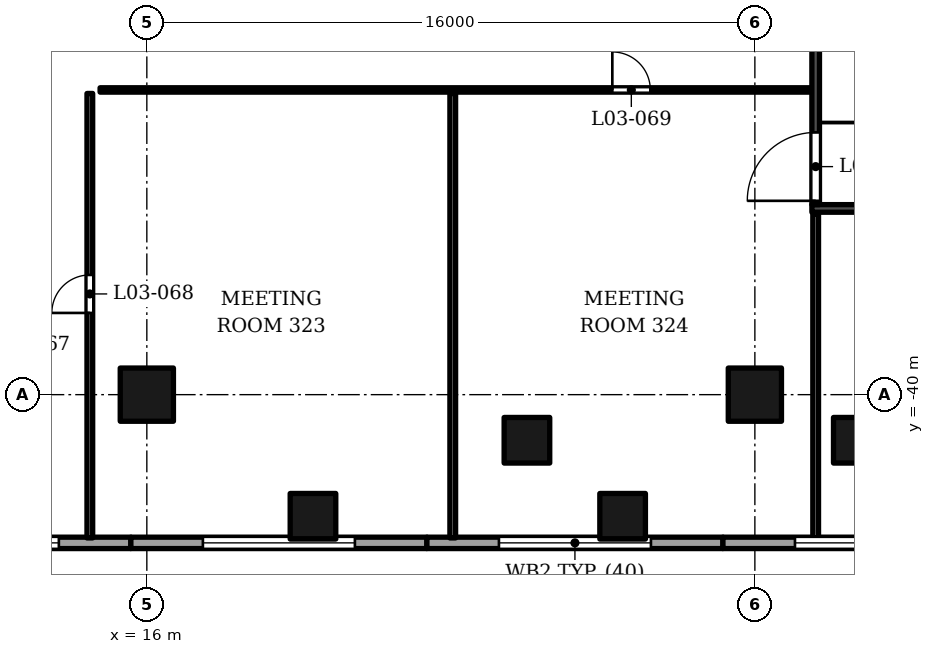
"""IFC4 building model, lengths in metres.
Left out: names, types, materials, properties, quantities, classifications, styles, units other than length and angle.
Written with IfcOpenShell. Run it as: python <this file> out.ifc"""

import sys

from ifc_helpers import new_model, si_unit, direction, frame, frame_2d, origin, origin_2d, place, context, subcontext, project, spatial, rectangle, extrude, element, fill, save


model = new_model("IFC4")
c1 = context("Model", 3, precision=1e-05, world=origin(), true_north=direction((0.0, 1.0)))
c2 = subcontext(c1, "Body", "Model", "MODEL_VIEW")
j1 = project(units=[si_unit("LENGTHUNIT", "METRE"), si_unit("PLANEANGLEUNIT", "RADIAN")], contexts=[c1])
p1 = place(None, origin())
s1 = spatial("IfcSite", under=j1, at=p1, CompositionType="ELEMENT")
p2 = place(p1, origin())
s2 = spatial("IfcBuilding", under=s1, at=p2, CompositionType="ELEMENT")
p3 = place(p2, frame((0.0, 0.0, 29.0)))
s3 = spatial("IfcBuildingStorey", under=s2, at=p3, CompositionType="ELEMENT", Elevation=29.0)
for number, where, z_axis, x_axis in (
    (1, (16.0, -40.0, 0.0), (0.0, 0.0, 1.0), (1.0, 0.0, 0.0)),
    (2, (32.0, -40.0, 0.0), (0.0, 0.0, 1.0), (1.0, 0.0, 0.0)),
):
    element("IfcColumn", number, at=place(p3, frame(where, z_axis=z_axis, x_axis=x_axis)), inside=s3, PredefinedType="COLUMN", context=c2, shape_type="SweptSolid", body=[
        extrude(rectangle(XDim=1.4, YDim=1.4, at=origin_2d()), origin(), (0.0, 0.0, 1.0), 5.5),
    ])
for number, where, z_axis, x_axis in (
    (3, (34.669, -41.2, 0.0), (0.0, 0.0, 1.0), (1.0, 0.0, 0.0)),
    (4, (26.002, -41.2, 0.0), (0.0, 0.0, 1.0), (1.0, 0.0, 0.0)),
    (5, (28.52, -43.2, 0.0), (0.0, 0.0, 1.0), (1.0, 0.0, 0.0)),
    (6, (20.372, -43.2, 0.0), (0.0, 0.0, 1.0), (1.0, 0.0, 0.0)),
):
    element("IfcColumn", number, at=place(p3, frame(where, z_axis=z_axis, x_axis=x_axis)), inside=s3, PredefinedType="COLUMN", context=c2, shape_type="SweptSolid", body=[
        extrude(rectangle(XDim=1.2, YDim=1.2, at=origin_2d()), origin(), (0.0, 0.0, 1.0), 5.5),
    ])
p4 = place(p3, frame((7.79, -43.9, 0.0), z_axis=(0.0, 0.0, 1.0), x_axis=(1.0, 0.0, 0.0)))
e7 = element("IfcWall", 7, at=p4, inside=s3, PredefinedType="SOLIDWALL", context=c2, shape_type="SweptSolid", body=[
    extrude(rectangle(XDim=7.79, YDim=0.3, at=frame_2d((3.895, 0.0))), origin(), (0.0, 0.0, 1.0), 4.1),
])
p5 = place(p4, frame((1.895, 0.0, 1.0)))
e8 = element("IfcOpeningElement", 8, at=p5, cuts=e7, PredefinedType="OPENING", context=c2, shape_type="SweptSolid", body=[
    extrude(rectangle(XDim=4.0, YDim=1.8, at=frame_2d((2.0, 0.9))), frame((0.0, 0.16, 0.0), z_axis=(0.0, -1.0, 0.0), x_axis=(1.0, 0.0, 0.0)), (0.0, 0.0, 1.0), 0.32),
])
p6 = place(p3, frame((15.58, -43.9, 0.0), z_axis=(0.0, 0.0, 1.0), x_axis=(1.0, 0.0, 0.0)))
e9 = element("IfcWall", 9, at=p6, inside=s3, PredefinedType="SOLIDWALL", context=c2, shape_type="SweptSolid", body=[
    extrude(rectangle(XDim=7.79, YDim=0.3, at=frame_2d((3.895, 0.0))), origin(), (0.0, 0.0, 1.0), 4.1),
])
p7 = place(p6, frame((1.895, 0.0, 1.0)))
e10 = element("IfcOpeningElement", 10, at=p7, cuts=e9, PredefinedType="OPENING", context=c2, shape_type="SweptSolid", body=[
    extrude(rectangle(XDim=4.0, YDim=1.8, at=frame_2d((2.0, 0.9))), frame((0.0, 0.16, 0.0), z_axis=(0.0, -1.0, 0.0), x_axis=(1.0, 0.0, 0.0)), (0.0, 0.0, 1.0), 0.32),
])
p8 = place(p3, frame((23.37, -43.9, 0.0), z_axis=(0.0, 0.0, 1.0), x_axis=(1.0, 0.0, 0.0)))
e11 = element("IfcWall", 11, at=p8, inside=s3, PredefinedType="SOLIDWALL", context=c2, shape_type="SweptSolid", body=[
    extrude(rectangle(XDim=7.79, YDim=0.3, at=frame_2d((3.895, 0.0))), origin(), (0.0, 0.0, 1.0), 4.1),
])
p9 = place(p8, frame((1.895, 0.0, 1.0)))
e12 = element("IfcOpeningElement", 12, at=p9, cuts=e11, PredefinedType="OPENING", context=c2, shape_type="SweptSolid", body=[
    extrude(rectangle(XDim=4.0, YDim=1.8, at=frame_2d((2.0, 0.9))), frame((0.0, 0.16, 0.0), z_axis=(0.0, -1.0, 0.0), x_axis=(1.0, 0.0, 0.0)), (0.0, 0.0, 1.0), 0.32),
])
p10 = place(p3, frame((31.16, -43.9, 0.0), z_axis=(0.0, 0.0, 1.0), x_axis=(1.0, 0.0, 0.0)))
e13 = element("IfcWall", 13, at=p10, inside=s3, PredefinedType="SOLIDWALL", context=c2, shape_type="SweptSolid", body=[
    extrude(rectangle(XDim=7.79, YDim=0.3, at=frame_2d((3.895, 0.0))), origin(), (0.0, 0.0, 1.0), 4.1),
])
p11 = place(p10, frame((1.895, 0.0, 1.0)))
e14 = element("IfcOpeningElement", 14, at=p11, cuts=e13, PredefinedType="OPENING", context=c2, shape_type="SweptSolid", body=[
    extrude(rectangle(XDim=4.0, YDim=1.8, at=frame_2d((2.0, 0.9))), frame((0.0, 0.16, 0.0), z_axis=(0.0, -1.0, 0.0), x_axis=(1.0, 0.0, 0.0)), (0.0, 0.0, 1.0), 0.32),
])
p12 = place(p3, frame((33.5, -35.1, 0.0), z_axis=(0.0, 0.0, 1.0), x_axis=(1.0, 0.0, 0.0)))
e15 = element("IfcWall", 15, at=p12, inside=s3, PredefinedType="SOLIDWALL", context=c2, shape_type="SweptSolid", body=[
    extrude(rectangle(XDim=4.87, YDim=0.2, at=frame_2d((2.435, 0.0))), origin(), (0.0, 0.0, 1.0), 5.05),
])
p13 = place(p3, frame((33.6, -35.0, 0.0), z_axis=(0.0, 0.0, 1.0), x_axis=(0.0, 1.0, 0.0)))
e16 = element("IfcWall", 16, at=p13, inside=s3, PredefinedType="SOLIDWALL", context=c2, shape_type="SweptSolid", body=[
    extrude(rectangle(XDim=6.65, YDim=0.2, at=frame_2d((3.325, 0.0))), origin(), (0.0, 0.0, 1.0), 5.05),
])
p14 = place(p13, frame((0.1, 0.0, 0.0)))
e17 = element("IfcOpeningElement", 17, at=p14, cuts=e16, PredefinedType="OPENING", context=c2, shape_type="SweptSolid", body=[
    extrude(rectangle(XDim=1.8, YDim=2.4, at=frame_2d((0.9, 1.2))), frame((0.0, 0.11, 0.0), z_axis=(0.0, -1.0, 0.0), x_axis=(1.0, 0.0, 0.0)), (0.0, 0.0, 1.0), 0.22),
])
p15 = place(p3, frame((14.5, -43.77, 0.0), z_axis=(0.0, 0.0, 1.0), x_axis=(0.0, 1.0, 0.0)))
e18 = element("IfcWall", 18, at=p15, inside=s3, PredefinedType="PARTITIONING", context=c2, shape_type="SweptSolid", body=[
    extrude(rectangle(XDim=11.695, YDim=0.15, at=frame_2d((5.848, 0.0))), origin(), (0.0, 0.0, 1.0), 3.85),
])
p16 = place(p15, frame((5.92, 0.0, 0.0)))
e19 = element("IfcOpeningElement", 19, at=p16, cuts=e18, PredefinedType="OPENING", context=c2, shape_type="SweptSolid", body=[
    extrude(rectangle(XDim=1.0, YDim=2.1, at=frame_2d((0.5, 1.05))), frame((0.0, 0.085, 0.0), z_axis=(0.0, -1.0, 0.0), x_axis=(1.0, 0.0, 0.0)), (0.0, 0.0, 1.0), 0.17),
])
p17 = place(p3, frame((24.05, -43.77, 0.0), z_axis=(0.0, 0.0, 1.0), x_axis=(0.0, 1.0, 0.0)))
e20 = element("IfcWall", 20, at=p17, inside=s3, PredefinedType="PARTITIONING", context=c2, shape_type="SweptSolid", body=[
    extrude(rectangle(XDim=11.695, YDim=0.15, at=frame_2d((5.848, 0.0))), origin(), (0.0, 0.0, 1.0), 3.85),
])
p18 = place(p3, frame((33.6, -43.77, 0.0), z_axis=(0.0, 0.0, 1.0), x_axis=(0.0, 1.0, 0.0)))
e21 = element("IfcWall", 21, at=p18, inside=s3, PredefinedType="PARTITIONING", context=c2, shape_type="SweptSolid", body=[
    extrude(rectangle(XDim=8.53, YDim=0.15, at=frame_2d((4.265, 0.0))), origin(), (0.0, 0.0, 1.0), 3.85),
])
p19 = place(p3, frame((14.77, -31.982, 0.0), z_axis=(0.0, 0.0, 1.0), x_axis=(1.0, 0.0, 0.0)))
e22 = element("IfcWall", 22, at=p19, inside=s3, PredefinedType="PARTITIONING", context=c2, shape_type="SweptSolid", body=[
    extrude(rectangle(XDim=18.69, YDim=0.115, at=frame_2d((9.345, 0.0))), origin(), (0.0, 0.0, 1.0), 3.85),
])
p20 = place(p19, frame((13.479, 0.0, 0.0)))
e23 = element("IfcOpeningElement", 23, at=p20, cuts=e22, PredefinedType="OPENING", context=c2, shape_type="SweptSolid", body=[
    extrude(rectangle(XDim=1.0, YDim=2.1, at=frame_2d((0.5, 1.05))), frame((0.0, 0.067, 0.0), z_axis=(0.0, -1.0, 0.0), x_axis=(1.0, 0.0, 0.0)), (0.0, 0.0, 1.0), 0.135),
])
p21 = place(p5, origin())
e24 = element("IfcWindow", 24, at=p21, inside=s3, PartitioningType="SINGLE_PANEL", PredefinedType="WINDOW", context=c2, shape_type="SweptSolid", body=[
    extrude(rectangle(XDim=4.0, YDim=1.8, at=frame_2d((2.0, 0.9))), frame((0.0, 0.03, 0.0), z_axis=(0.0, -1.0, 0.0), x_axis=(1.0, 0.0, 0.0)), (0.0, 0.0, 1.0), 0.06),
])
fill(e8, e24)
p22 = place(p7, origin())
e25 = element("IfcWindow", 25, at=p22, inside=s3, PartitioningType="SINGLE_PANEL", PredefinedType="WINDOW", context=c2, shape_type="SweptSolid", body=[
    extrude(rectangle(XDim=4.0, YDim=1.8, at=frame_2d((2.0, 0.9))), frame((0.0, 0.03, 0.0), z_axis=(0.0, -1.0, 0.0), x_axis=(1.0, 0.0, 0.0)), (0.0, 0.0, 1.0), 0.06),
])
fill(e10, e25)
p23 = place(p9, origin())
e26 = element("IfcWindow", 26, at=p23, inside=s3, PartitioningType="SINGLE_PANEL", PredefinedType="WINDOW", context=c2, shape_type="SweptSolid", body=[
    extrude(rectangle(XDim=4.0, YDim=1.8, at=frame_2d((2.0, 0.9))), frame((0.0, 0.03, 0.0), z_axis=(0.0, -1.0, 0.0), x_axis=(1.0, 0.0, 0.0)), (0.0, 0.0, 1.0), 0.06),
])
fill(e12, e26)
p24 = place(p11, origin())
e27 = element("IfcWindow", 27, at=p24, inside=s3, PartitioningType="SINGLE_PANEL", PredefinedType="WINDOW", context=c2, shape_type="SweptSolid", body=[
    extrude(rectangle(XDim=4.0, YDim=1.8, at=frame_2d((2.0, 0.9))), frame((0.0, 0.03, 0.0), z_axis=(0.0, -1.0, 0.0), x_axis=(1.0, 0.0, 0.0)), (0.0, 0.0, 1.0), 0.06),
])
fill(e14, e27)
p25 = place(p14, origin())
e28 = element("IfcDoor", 28, at=p25, inside=s3, OperationType="DOUBLE_DOOR_SINGLE_SWING", PredefinedType="DOOR", context=c2, shape_type="SweptSolid", body=[
    extrude(rectangle(XDim=1.8, YDim=2.4, at=frame_2d((0.9, 1.2))), frame((0.0, 0.025, 0.0), z_axis=(0.0, -1.0, 0.0), x_axis=(1.0, 0.0, 0.0)), (0.0, 0.0, 1.0), 0.05),
])
fill(e17, e28)
p26 = place(p16, origin())
e29 = element("IfcDoor", 29, at=p26, inside=s3, OperationType="SINGLE_SWING_LEFT", PredefinedType="DOOR", context=c2, shape_type="SweptSolid", body=[
    extrude(rectangle(XDim=1.0, YDim=2.1, at=frame_2d((0.5, 1.05))), frame((0.0, 0.025, 0.0), z_axis=(0.0, -1.0, 0.0), x_axis=(1.0, 0.0, 0.0)), (0.0, 0.0, 1.0), 0.05),
])
fill(e19, e29)
p27 = place(p20, origin())
e30 = element("IfcDoor", 30, at=p27, inside=s3, OperationType="SINGLE_SWING_LEFT", PredefinedType="DOOR", context=c2, shape_type="SweptSolid", body=[
    extrude(rectangle(XDim=1.0, YDim=2.1, at=frame_2d((0.5, 1.05))), frame((0.0, 0.025, 0.0), z_axis=(0.0, -1.0, 0.0), x_axis=(1.0, 0.0, 0.0)), (0.0, 0.0, 1.0), 0.05),
])
fill(e23, e30)
save(model, sys.argv[1])
